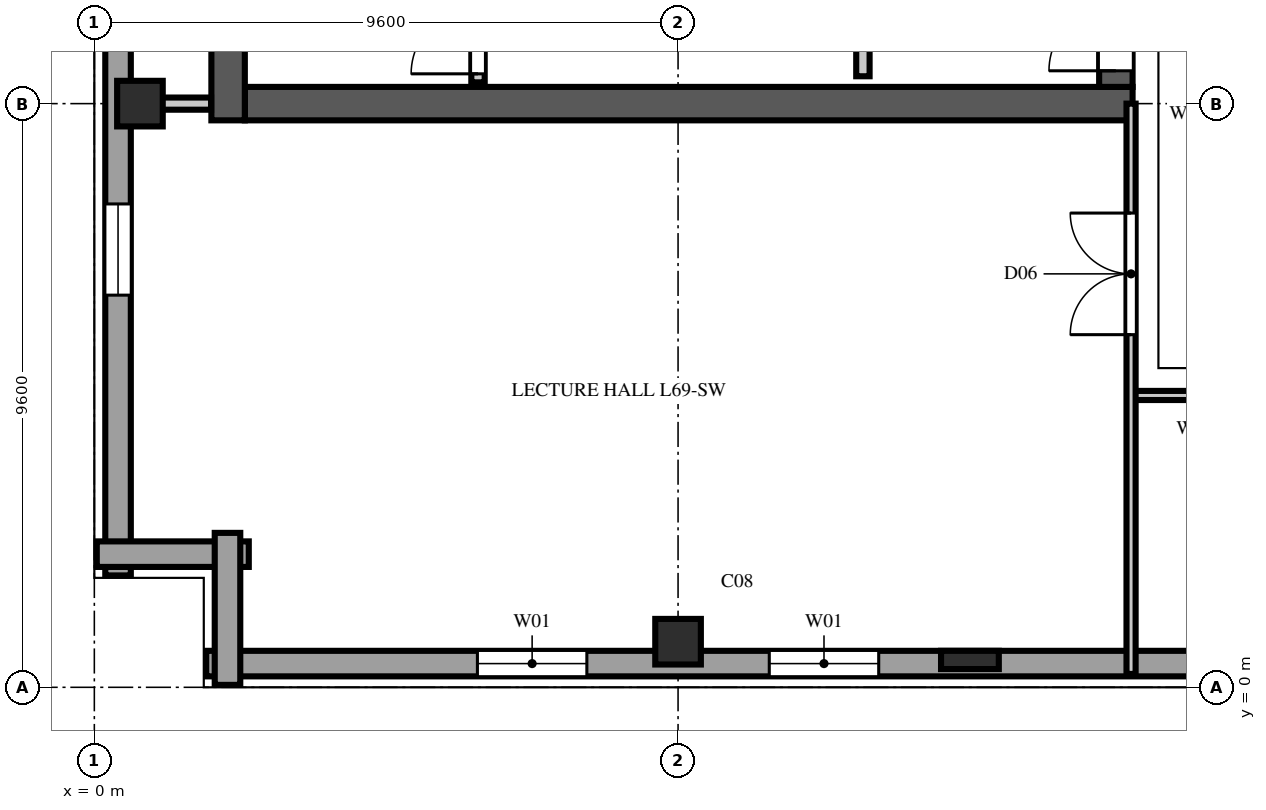
"""IFC4 building model, lengths in metres.
Left out: names, types, materials, properties, quantities, classifications, styles, units other than length and angle.
Written with IfcOpenShell. Run it as: python <this file> out.ifc"""

import sys

from ifc_helpers import new_model, si_unit, direction, frame, frame_2d, origin, origin_2d, place, context, subcontext, project, spatial, rectangle, extrude, element, fill, save


model = new_model("IFC4")
c1 = context("Model", 3, precision=1e-05, world=origin(), true_north=direction((0.0, 1.0)))
c2 = subcontext(c1, "Body", "Model", "MODEL_VIEW")
j1 = project(units=[si_unit("LENGTHUNIT", "METRE"), si_unit("PLANEANGLEUNIT", "RADIAN")], contexts=[c1])
p1 = place(None, origin())
s1 = spatial("IfcSite", under=j1, at=p1, CompositionType="ELEMENT")
p2 = place(p1, origin())
s2 = spatial("IfcBuilding", under=s1, at=p2, CompositionType="ELEMENT")
p3 = place(p2, frame((0.0, 0.0, 273.4)))
s3 = spatial("IfcBuildingStorey", under=s2, at=p3, CompositionType="ELEMENT", Elevation=273.4)
p4 = place(p3, frame((2.475, 9.6, 0.0), z_axis=(0.0, 0.0, 1.0), x_axis=(1.0, 0.0, 0.0)))
e1 = element("IfcWall", 1, at=p4, inside=s3, PredefinedType="SHEAR", context=c2, shape_type="SweptSolid", body=[
    extrude(rectangle(XDim=14.6, YDim=0.55, at=frame_2d((7.3, 0.0))), origin(), (0.0, 0.0, 1.0), 3.54),
])
p5 = place(p3, frame((2.2, 9.325, 0.0), z_axis=(0.0, 0.0, 1.0), x_axis=(0.0, 1.0, 0.0)))
e2 = element("IfcWall", 2, at=p5, inside=s3, PredefinedType="SHEAR", context=c2, shape_type="SweptSolid", body=[
    extrude(rectangle(XDim=38.95, YDim=0.55, at=frame_2d((19.475, 0.0))), origin(), (0.0, 0.0, 1.0), 3.54),
])
p6 = place(p3, frame((16.8, 9.875, 0.0), z_axis=(0.0, 0.0, 1.0), x_axis=(0.0, 1.0, 0.0)))
e3 = element("IfcWall", 3, at=p6, inside=s3, PredefinedType="SHEAR", context=c2, shape_type="SweptSolid", body=[
    extrude(rectangle(XDim=12.525, YDim=0.55, at=frame_2d((6.262, 0.0))), origin(), (0.0, 0.0, 1.0), 3.54),
])
p7 = place(p6, frame((0.265, 0.0, 0.0)))
e4 = element("IfcOpeningElement", 4, at=p7, cuts=e3, PredefinedType="OPENING", context=c2, shape_type="SweptSolid", body=[
    extrude(rectangle(XDim=1.1, YDim=2.2, at=frame_2d((0.55, 1.1))), frame((0.0, 0.287, 0.0), z_axis=(0.0, -1.0, 0.0), x_axis=(1.0, 0.0, 0.0)), (0.0, 0.0, 1.0), 0.574),
])
for number, where, z_axis, x_axis in (
    (5, (0.75, 9.6, 0.0), (0.0, 0.0, 1.0), (1.0, 0.0, 0.0)),
    (6, (9.6, 0.75, 0.0), (0.0, 0.0, 1.0), (1.0, 0.0, 0.0)),
):
    element("IfcColumn", number, at=place(p3, frame(where, z_axis=z_axis, x_axis=x_axis)), inside=s3, PredefinedType="COLUMN", context=c2, shape_type="SweptSolid", body=[
        extrude(rectangle(XDim=0.75, YDim=0.75, at=origin_2d()), origin(), (0.0, 0.0, 1.0), 3.8),
    ])
p8 = place(p3, frame((14.4, 0.45, 0.0), z_axis=(0.0, 0.0, 1.0), x_axis=(1.0, 0.0, 0.0)))
e7 = element("IfcColumn", 7, at=p8, inside=s3, PredefinedType="PILASTER", context=c2, shape_type="SweptSolid", body=[
    extrude(rectangle(XDim=0.95, YDim=0.3, at=origin_2d()), origin(), (0.0, 0.0, 1.0), 3.8),
])
p9 = place(p3, frame((1.84, 0.39, 0.0), z_axis=(0.0, 0.0, 1.0), x_axis=(1.0, 0.0, 0.0)))
e8 = element("IfcWall", 8, at=p9, inside=s3, PredefinedType="SOLIDWALL", context=c2, shape_type="SweptSolid", body=[
    extrude(rectangle(XDim=44.32, YDim=0.42, at=frame_2d((22.16, 0.0))), origin(), (0.0, 0.0, 1.0), 3.54),
])
p10 = place(p9, frame((4.46, 0.0, 0.85)))
e9 = element("IfcOpeningElement", 9, at=p10, cuts=e8, PredefinedType="OPENING", context=c2, shape_type="SweptSolid", body=[
    extrude(rectangle(XDim=1.8, YDim=1.85, at=frame_2d((0.9, 0.925))), frame((0.0, 0.222, 0.0), z_axis=(0.0, -1.0, 0.0), x_axis=(1.0, 0.0, 0.0)), (0.0, 0.0, 1.0), 0.444),
])
p11 = place(p9, frame((9.26, 0.0, 0.85)))
e10 = element("IfcOpeningElement", 10, at=p11, cuts=e8, PredefinedType="OPENING", context=c2, shape_type="SweptSolid", body=[
    extrude(rectangle(XDim=1.8, YDim=1.85, at=frame_2d((0.9, 0.925))), frame((0.0, 0.222, 0.0), z_axis=(0.0, -1.0, 0.0), x_axis=(1.0, 0.0, 0.0)), (0.0, 0.0, 1.0), 0.444),
])
p12 = place(p9, frame((18.86, 0.0, 0.85)))
e11 = element("IfcOpeningElement", 11, at=p12, cuts=e8, PredefinedType="OPENING", context=c2, shape_type="SweptSolid", body=[
    extrude(rectangle(XDim=1.8, YDim=1.85, at=frame_2d((0.9, 0.925))), frame((0.0, 0.222, 0.0), z_axis=(0.0, -1.0, 0.0), x_axis=(1.0, 0.0, 0.0)), (0.0, 0.0, 1.0), 0.444),
])
p13 = place(p9, frame((28.46, 0.0, 0.85)))
e12 = element("IfcOpeningElement", 12, at=p13, cuts=e8, PredefinedType="OPENING", context=c2, shape_type="SweptSolid", body=[
    extrude(rectangle(XDim=1.8, YDim=1.85, at=frame_2d((0.9, 0.925))), frame((0.0, 0.222, 0.0), z_axis=(0.0, -1.0, 0.0), x_axis=(1.0, 0.0, 0.0)), (0.0, 0.0, 1.0), 0.444),
])
p14 = place(p9, frame((33.26, 0.0, 0.85)))
e13 = element("IfcOpeningElement", 13, at=p14, cuts=e8, PredefinedType="OPENING", context=c2, shape_type="SweptSolid", body=[
    extrude(rectangle(XDim=1.8, YDim=1.85, at=frame_2d((0.9, 0.925))), frame((0.0, 0.222, 0.0), z_axis=(0.0, -1.0, 0.0), x_axis=(1.0, 0.0, 0.0)), (0.0, 0.0, 1.0), 0.444),
])
p15 = place(p9, frame((38.06, 0.0, 0.85)))
e14 = element("IfcOpeningElement", 14, at=p15, cuts=e8, PredefinedType="OPENING", context=c2, shape_type="SweptSolid", body=[
    extrude(rectangle(XDim=1.8, YDim=1.85, at=frame_2d((0.9, 0.925))), frame((0.0, 0.222, 0.0), z_axis=(0.0, -1.0, 0.0), x_axis=(1.0, 0.0, 0.0)), (0.0, 0.0, 1.0), 0.444),
])
p16 = place(p3, frame((0.39, 46.16, 0.0), z_axis=(0.0, 0.0, 1.0), x_axis=(0.0, -1.0, 0.0)))
e15 = element("IfcWall", 15, at=p16, inside=s3, PredefinedType="SOLIDWALL", context=c2, shape_type="SweptSolid", body=[
    extrude(rectangle(XDim=44.32, YDim=0.42, at=frame_2d((22.16, 0.0))), origin(), (0.0, 0.0, 1.0), 3.54),
])
p17 = place(p16, frame((4.885, 0.0, 0.9)))
e16 = element("IfcOpeningElement", 16, at=p17, cuts=e15, PredefinedType="OPENING", context=c2, shape_type="SweptSolid", body=[
    extrude(rectangle(XDim=0.95, YDim=1.85, at=frame_2d((0.475, 0.925))), frame((0.0, 0.222, 0.0), z_axis=(0.0, -1.0, 0.0), x_axis=(1.0, 0.0, 0.0)), (0.0, 0.0, 1.0), 0.444),
])
p18 = place(p16, frame((9.41, 0.0, 0.9)))
e17 = element("IfcOpeningElement", 17, at=p18, cuts=e15, PredefinedType="OPENING", context=c2, shape_type="SweptSolid", body=[
    extrude(rectangle(XDim=1.5, YDim=1.85, at=frame_2d((0.75, 0.925))), frame((0.0, 0.222, 0.0), z_axis=(0.0, -1.0, 0.0), x_axis=(1.0, 0.0, 0.0)), (0.0, 0.0, 1.0), 0.444),
])
p19 = place(p16, frame((14.485, 0.0, 0.9)))
e18 = element("IfcOpeningElement", 18, at=p19, cuts=e15, PredefinedType="OPENING", context=c2, shape_type="SweptSolid", body=[
    extrude(rectangle(XDim=0.95, YDim=1.85, at=frame_2d((0.475, 0.925))), frame((0.0, 0.222, 0.0), z_axis=(0.0, -1.0, 0.0), x_axis=(1.0, 0.0, 0.0)), (0.0, 0.0, 1.0), 0.444),
])
p20 = place(p16, frame((19.01, 0.0, 0.9)))
e19 = element("IfcOpeningElement", 19, at=p20, cuts=e15, PredefinedType="OPENING", context=c2, shape_type="SweptSolid", body=[
    extrude(rectangle(XDim=1.5, YDim=1.85, at=frame_2d((0.75, 0.925))), frame((0.0, 0.222, 0.0), z_axis=(0.0, -1.0, 0.0), x_axis=(1.0, 0.0, 0.0)), (0.0, 0.0, 1.0), 0.444),
])
p21 = place(p16, frame((24.085, 0.0, 0.9)))
e20 = element("IfcOpeningElement", 20, at=p21, cuts=e15, PredefinedType="OPENING", context=c2, shape_type="SweptSolid", body=[
    extrude(rectangle(XDim=0.95, YDim=1.85, at=frame_2d((0.475, 0.925))), frame((0.0, 0.222, 0.0), z_axis=(0.0, -1.0, 0.0), x_axis=(1.0, 0.0, 0.0)), (0.0, 0.0, 1.0), 0.444),
])
p22 = place(p16, frame((28.61, 0.0, 0.9)))
e21 = element("IfcOpeningElement", 21, at=p22, cuts=e15, PredefinedType="OPENING", context=c2, shape_type="SweptSolid", body=[
    extrude(rectangle(XDim=1.5, YDim=1.85, at=frame_2d((0.75, 0.925))), frame((0.0, 0.222, 0.0), z_axis=(0.0, -1.0, 0.0), x_axis=(1.0, 0.0, 0.0)), (0.0, 0.0, 1.0), 0.444),
])
p23 = place(p16, frame((33.685, 0.0, 0.9)))
e22 = element("IfcOpeningElement", 22, at=p23, cuts=e15, PredefinedType="OPENING", context=c2, shape_type="SweptSolid", body=[
    extrude(rectangle(XDim=0.95, YDim=1.85, at=frame_2d((0.475, 0.925))), frame((0.0, 0.222, 0.0), z_axis=(0.0, -1.0, 0.0), x_axis=(1.0, 0.0, 0.0)), (0.0, 0.0, 1.0), 0.444),
])
p24 = place(p16, frame((38.21, 0.0, 0.9)))
e23 = element("IfcOpeningElement", 23, at=p24, cuts=e15, PredefinedType="OPENING", context=c2, shape_type="SweptSolid", body=[
    extrude(rectangle(XDim=1.5, YDim=1.85, at=frame_2d((0.75, 0.925))), frame((0.0, 0.222, 0.0), z_axis=(0.0, -1.0, 0.0), x_axis=(1.0, 0.0, 0.0)), (0.0, 0.0, 1.0), 0.444),
])
for number, where, z_axis, x_axis in (
    (24, (0.04, 2.19, 0.0), (0.0, 0.0, 1.0), (1.0, 0.0, 0.0)),
    (25, (2.19, 2.54, 0.0), (0.0, 0.0, 1.0), (0.0, -1.0, 0.0)),
):
    element("IfcWall", number, at=place(p3, frame(where, z_axis=z_axis, x_axis=x_axis)), inside=s3, PredefinedType="SOLIDWALL", context=c2, shape_type="SweptSolid", body=[
        extrude(rectangle(XDim=2.5, YDim=0.42, at=frame_2d((1.25, 0.0))), origin(), (0.0, 0.0, 1.0), 3.54),
    ])
p25 = place(p3, frame((6.31, 9.95, 0.0), z_axis=(0.0, 0.0, 1.0), x_axis=(0.0, 1.0, 0.0)))
e26 = element("IfcWall", 26, at=p25, inside=s3, PredefinedType="SOLIDWALL", context=c2, shape_type="SweptSolid", body=[
    extrude(rectangle(XDim=7.81, YDim=0.22, at=frame_2d((3.905, 0.0))), origin(), (0.0, 0.0, 1.0), 3.54),
])
p26 = place(p25, frame((0.14, 0.0, 0.0)))
e27 = element("IfcOpeningElement", 27, at=p26, cuts=e26, PredefinedType="OPENING", context=c2, shape_type="SweptSolid", body=[
    extrude(rectangle(XDim=1.1, YDim=2.2, at=frame_2d((0.55, 1.1))), frame((0.0, 0.122, 0.0), z_axis=(0.0, -1.0, 0.0), x_axis=(1.0, 0.0, 0.0)), (0.0, 0.0, 1.0), 0.244),
])
p27 = place(p3, frame((12.64, 10.05, 0.0), z_axis=(0.0, 0.0, 1.0), x_axis=(0.0, 1.0, 0.0)))
e28 = element("IfcWall", 28, at=p27, inside=s3, PredefinedType="SOLIDWALL", context=c2, shape_type="SweptSolid", body=[
    extrude(rectangle(XDim=7.71, YDim=0.22, at=frame_2d((3.855, 0.0))), origin(), (0.0, 0.0, 1.0), 3.54),
])
p28 = place(p3, frame((0.85, 9.6, 0.0), z_axis=(0.0, 0.0, 1.0), x_axis=(1.0, 0.0, 0.0)))
e29 = element("IfcWall", 29, at=p28, inside=s3, PredefinedType="SOLIDWALL", context=c2, shape_type="SweptSolid", body=[
    extrude(rectangle(XDim=1.07, YDim=0.2, at=frame_2d((0.535, 0.0))), origin(), (0.0, 0.0, 1.0), 3.123),
])
p29 = place(p3, frame((17.05, 4.8, 0.0), z_axis=(0.0, 0.0, 1.0), x_axis=(1.0, 0.0, 0.0)))
e30 = element("IfcWall", 30, at=p29, inside=s3, PredefinedType="PARTITIONING", context=c2, shape_type="SweptSolid", body=[
    extrude(rectangle(XDim=2.15, YDim=0.15, at=frame_2d((1.075, 0.0))), origin(), (0.0, 0.0, 1.0), 3.54),
])
p30 = place(p3, frame((17.05, 0.22, 0.0), z_axis=(0.0, 0.0, 1.0), x_axis=(0.0, 1.0, 0.0)))
e31 = element("IfcWall", 31, at=p30, inside=s3, PredefinedType="PARTITIONING", context=c2, shape_type="SweptSolid", body=[
    extrude(rectangle(XDim=9.38, YDim=0.15, at=frame_2d((4.69, 0.0))), origin(), (0.0, 0.0, 1.0), 3.54),
])
p31 = place(p30, frame((5.58, 0.0, 0.0)))
e32 = element("IfcOpeningElement", 32, at=p31, cuts=e31, PredefinedType="OPENING", context=c2, shape_type="SweptSolid", body=[
    extrude(rectangle(XDim=2.0, YDim=2.3, at=frame_2d((1.0, 1.15))), frame((0.0, 0.087, 0.0), z_axis=(0.0, -1.0, 0.0), x_axis=(1.0, 0.0, 0.0)), (0.0, 0.0, 1.0), 0.174),
])
p32 = place(p10, origin())
e33 = element("IfcWindow", 33, at=p32, inside=s3, PartitioningType="DOUBLE_PANEL_VERTICAL", PredefinedType="WINDOW", context=c2, shape_type="SweptSolid", body=[
    extrude(rectangle(XDim=1.8, YDim=1.85, at=frame_2d((0.9, 0.925))), frame((0.0, 0.11, 0.0), z_axis=(0.0, -1.0, 0.0), x_axis=(1.0, 0.0, 0.0)), (0.0, 0.0, 1.0), 0.06),
])
fill(e9, e33)
p33 = place(p11, origin())
e34 = element("IfcWindow", 34, at=p33, inside=s3, PartitioningType="DOUBLE_PANEL_VERTICAL", PredefinedType="WINDOW", context=c2, shape_type="SweptSolid", body=[
    extrude(rectangle(XDim=1.8, YDim=1.85, at=frame_2d((0.9, 0.925))), frame((0.0, 0.11, 0.0), z_axis=(0.0, -1.0, 0.0), x_axis=(1.0, 0.0, 0.0)), (0.0, 0.0, 1.0), 0.06),
])
fill(e10, e34)
p34 = place(p24, origin())
e35 = element("IfcWindow", 35, at=p34, inside=s3, PartitioningType="DOUBLE_PANEL_VERTICAL", PredefinedType="WINDOW", context=c2, shape_type="SweptSolid", body=[
    extrude(rectangle(XDim=1.5, YDim=1.85, at=frame_2d((0.75, 0.925))), frame((0.0, 0.11, 0.0), z_axis=(0.0, -1.0, 0.0), x_axis=(1.0, 0.0, 0.0)), (0.0, 0.0, 1.0), 0.06),
])
fill(e23, e35)
p35 = place(p26, origin())
e36 = element("IfcDoor", 36, at=p35, inside=s3, OperationType="SINGLE_SWING_LEFT", PredefinedType="DOOR", context=c2, shape_type="SweptSolid", body=[
    extrude(rectangle(XDim=1.1, YDim=2.2, at=frame_2d((0.55, 1.1))), frame((0.0, 0.025, 0.0), z_axis=(0.0, -1.0, 0.0), x_axis=(1.0, 0.0, 0.0)), (0.0, 0.0, 1.0), 0.05),
])
fill(e27, e36)
p36 = place(p7, origin())
e37 = element("IfcDoor", 37, at=p36, inside=s3, OperationType="SINGLE_SWING_LEFT", PredefinedType="DOOR", context=c2, shape_type="SweptSolid", body=[
    extrude(rectangle(XDim=1.1, YDim=2.2, at=frame_2d((0.55, 1.1))), frame((0.0, 0.025, 0.0), z_axis=(0.0, -1.0, 0.0), x_axis=(1.0, 0.0, 0.0)), (0.0, 0.0, 1.0), 0.05),
])
fill(e4, e37)
p37 = place(p31, origin())
e38 = element("IfcDoor", 38, at=p37, inside=s3, OperationType="DOUBLE_SWING_LEFT", PredefinedType="DOOR", context=c2, shape_type="SweptSolid", body=[
    extrude(rectangle(XDim=2.0, YDim=2.3, at=frame_2d((1.0, 1.15))), frame((0.0, 0.025, 0.0), z_axis=(0.0, -1.0, 0.0), x_axis=(1.0, 0.0, 0.0)), (0.0, 0.0, 1.0), 0.05),
])
fill(e32, e38)
save(model, sys.argv[1])
